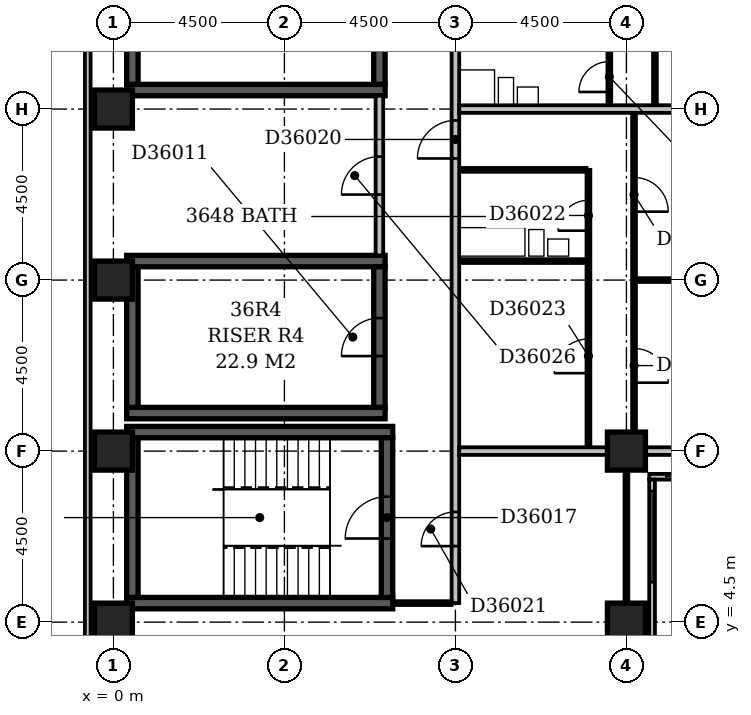
"""IFC4 building model, lengths in metres.
Left out: names, types, materials, properties, quantities, classifications, styles, units other than length and angle.
Written with IfcOpenShell. Run it as: python <this file> out.ifc"""

import sys

from ifc_helpers import new_model, si_unit, direction, frame, frame_2d, origin, origin_2d, place, context, subcontext, project, spatial, rectangle, extrude, element, fill, save


model = new_model("IFC4")
c1 = context("Model", 3, precision=1e-05, world=origin(), true_north=direction((0.0, 1.0)))
c2 = subcontext(c1, "Body", "Model", "MODEL_VIEW")
j1 = project(units=[si_unit("LENGTHUNIT", "METRE"), si_unit("PLANEANGLEUNIT", "RADIAN")], contexts=[c1])
p1 = place(None, origin())
s1 = spatial("IfcSite", under=j1, at=p1, CompositionType="ELEMENT")
p2 = place(p1, origin())
s2 = spatial("IfcBuilding", under=s1, at=p2, CompositionType="ELEMENT")
p3 = place(p2, frame((0.0, 0.0, 144.8)))
s3 = spatial("IfcBuildingStorey", under=s2, at=p3, CompositionType="ELEMENT", Elevation=144.8)
for number, where, z_axis, x_axis in (
    (1, (0.35, 5.0, -0.3), (0.0, 0.0, 1.0), (1.0, 0.0, 0.0)),
    (2, (0.35, 9.5, -0.3), (0.0, 0.0, 1.0), (1.0, 0.0, 0.0)),
):
    element("IfcWall", number, at=place(p3, frame(where, z_axis=z_axis, x_axis=x_axis)), inside=s3, PredefinedType="SHEAR", context=c2, shape_type="SweptSolid", body=[
        extrude(rectangle(XDim=7.0, YDim=0.3, at=frame_2d((3.5, 0.0))), origin(), (0.0, 0.0, 1.0), 3.6),
    ])
for number, where, z_axis, x_axis in (
    (3, (0.35, 10.0, -0.3), (0.0, 0.0, 1.0), (1.0, 0.0, 0.0)),
    (4, (0.35, 14.0, -0.3), (0.0, 0.0, 1.0), (1.0, 0.0, 0.0)),
    (5, (0.35, 18.5, -0.3), (0.0, 0.0, 1.0), (1.0, 0.0, 0.0)),
):
    element("IfcWall", number, at=place(p3, frame(where, z_axis=z_axis, x_axis=x_axis)), inside=s3, PredefinedType="SHEAR", context=c2, shape_type="SweptSolid", body=[
        extrude(rectangle(XDim=6.8, YDim=0.3, at=frame_2d((3.4, 0.0))), origin(), (0.0, 0.0, 1.0), 3.6),
    ])
p4 = place(p3, frame((0.5, 5.15, -0.3), z_axis=(0.0, 0.0, 1.0), x_axis=(0.0, 1.0, 0.0)))
e6 = element("IfcWall", 6, at=p4, inside=s3, PredefinedType="SHEAR", context=c2, shape_type="SweptSolid", body=[
    extrude(rectangle(XDim=4.2, YDim=0.3, at=frame_2d((2.1, 0.0))), origin(), (0.0, 0.0, 1.0), 3.6),
])
for number, where, z_axis, x_axis in (
    (7, (0.5, 10.15, -0.3), (0.0, 0.0, 1.0), (0.0, 1.0, 0.0)),
    (8, (0.5, 18.65, -0.3), (0.0, 0.0, 1.0), (0.0, 1.0, 0.0)),
):
    element("IfcWall", number, at=place(p3, frame(where, z_axis=z_axis, x_axis=x_axis)), inside=s3, PredefinedType="SHEAR", context=c2, shape_type="SweptSolid", body=[
        extrude(rectangle(XDim=3.7, YDim=0.3, at=frame_2d((1.85, 0.0))), origin(), (0.0, 0.0, 1.0), 3.6),
    ])
p5 = place(p3, frame((7.0, 10.15, -0.3), z_axis=(0.0, 0.0, 1.0), x_axis=(0.0, 1.0, 0.0)))
e9 = element("IfcWall", 9, at=p5, inside=s3, PredefinedType="SHEAR", context=c2, shape_type="SweptSolid", body=[
    extrude(rectangle(XDim=3.7, YDim=0.3, at=frame_2d((1.85, 0.0))), origin(), (0.0, 0.0, 1.0), 3.6),
])
p6 = place(p5, frame((1.35, 0.0, 0.3)))
e10 = element("IfcOpeningElement", 10, at=p6, cuts=e9, PredefinedType="OPENING", context=c2, shape_type="SweptSolid", body=[
    extrude(rectangle(XDim=1.0, YDim=2.1, at=frame_2d((0.5, 1.05))), frame((0.0, 0.162, 0.0), z_axis=(0.0, -1.0, 0.0), x_axis=(1.0, 0.0, 0.0)), (0.0, 0.0, 1.0), 0.324),
])
p7 = place(p3, frame((7.0, 18.65, -0.3), z_axis=(0.0, 0.0, 1.0), x_axis=(0.0, 1.0, 0.0)))
e11 = element("IfcWall", 11, at=p7, inside=s3, PredefinedType="SHEAR", context=c2, shape_type="SweptSolid", body=[
    extrude(rectangle(XDim=3.7, YDim=0.3, at=frame_2d((1.85, 0.0))), origin(), (0.0, 0.0, 1.0), 3.6),
])
p8 = place(p7, frame((1.35, 0.0, 0.3)))
e12 = element("IfcOpeningElement", 12, at=p8, cuts=e11, PredefinedType="OPENING", context=c2, shape_type="SweptSolid", body=[
    extrude(rectangle(XDim=1.0, YDim=2.1, at=frame_2d((0.5, 1.05))), frame((0.0, 0.162, 0.0), z_axis=(0.0, -1.0, 0.0), x_axis=(1.0, 0.0, 0.0)), (0.0, 0.0, 1.0), 0.324),
])
p9 = place(p3, frame((7.2, 5.15, -0.3), z_axis=(0.0, 0.0, 1.0), x_axis=(0.0, 1.0, 0.0)))
e13 = element("IfcWall", 13, at=p9, inside=s3, PredefinedType="SHEAR", context=c2, shape_type="SweptSolid", body=[
    extrude(rectangle(XDim=4.2, YDim=0.3, at=frame_2d((2.1, 0.0))), origin(), (0.0, 0.0, 1.0), 3.6),
])
p10 = place(p9, frame((1.55, 0.0, 0.3)))
e14 = element("IfcOpeningElement", 14, at=p10, cuts=e13, PredefinedType="OPENING", context=c2, shape_type="SweptSolid", body=[
    extrude(rectangle(XDim=1.1, YDim=2.1, at=frame_2d((0.55, 1.05))), frame((0.0, 0.162, 0.0), z_axis=(0.0, -1.0, 0.0), x_axis=(1.0, 0.0, 0.0)), (0.0, 0.0, 1.0), 0.324),
])
for number, where, z_axis, x_axis in (
    (15, (0.0, 4.5, -0.3), (0.0, 0.0, 1.0), (1.0, 0.0, 0.0)),
    (16, (13.5, 4.5, -0.3), (0.0, 0.0, 1.0), (1.0, 0.0, 0.0)),
    (17, (0.0, 9.0, -0.3), (0.0, 0.0, 1.0), (1.0, 0.0, 0.0)),
    (18, (13.5, 9.0, -0.3), (0.0, 0.0, 1.0), (1.0, 0.0, 0.0)),
    (19, (0.0, 13.5, -0.3), (0.0, 0.0, 1.0), (1.0, 0.0, 0.0)),
    (20, (0.0, 18.0, -0.3), (0.0, 0.0, 1.0), (1.0, 0.0, 0.0)),
):
    element("IfcColumn", number, at=place(p3, frame(where, z_axis=z_axis, x_axis=x_axis)), inside=s3, PredefinedType="COLUMN", context=c2, shape_type="SweptSolid", body=[
        extrude(rectangle(XDim=1.0, YDim=1.0, at=origin_2d()), origin(), (0.0, 0.0, 1.0), 3.6),
    ])
p11 = place(p3, frame((14.175, 3.9, 0.0), z_axis=(0.0, 0.0, 1.0), x_axis=(0.0, 1.0, 0.0)))
e21 = element("IfcWall", 21, at=p11, inside=s3, PredefinedType="STANDARD", context=c2, shape_type="SweptSolid", body=[
    extrude(rectangle(XDim=4.35, YDim=0.15, at=frame_2d((2.175, 0.0))), origin(), (0.0, 0.0, 1.0), 2.7),
])
p12 = place(p11, frame((1.65, 0.0, 0.6)))
e22 = element("IfcOpeningElement", 22, at=p12, cuts=e21, PredefinedType="OPENING", context=c2, shape_type="SweptSolid", body=[
    extrude(rectangle(XDim=2.4, YDim=1.8, at=frame_2d((1.2, 0.9))), frame((0.0, 0.087, 0.0), z_axis=(0.0, -1.0, 0.0), x_axis=(1.0, 0.0, 0.0)), (0.0, 0.0, 1.0), 0.174),
])
p13 = place(p3, frame((14.1, 8.325, 0.0), z_axis=(0.0, 0.0, 1.0), x_axis=(1.0, 0.0, 0.0)))
e23 = element("IfcWall", 23, at=p13, inside=s3, PredefinedType="STANDARD", context=c2, shape_type="SweptSolid", body=[
    extrude(rectangle(XDim=4.65, YDim=0.15, at=frame_2d((2.325, 0.0))), origin(), (0.0, 0.0, 1.0), 2.7),
])
p14 = place(p13, frame((0.45, 0.0, 0.6)))
e24 = element("IfcOpeningElement", 24, at=p14, cuts=e23, PredefinedType="OPENING", context=c2, shape_type="SweptSolid", body=[
    extrude(rectangle(XDim=2.4, YDim=1.8, at=frame_2d((1.2, 0.9))), frame((0.0, 0.087, 0.0), z_axis=(0.0, -1.0, 0.0), x_axis=(1.0, 0.0, 0.0)), (0.0, 0.0, 1.0), 0.174),
])
p15 = place(p3, frame((-0.675, 59.1, 0.0), z_axis=(0.0, 0.0, 1.0), x_axis=(0.0, -1.0, 0.0)))
e25 = element("IfcWall", 25, at=p15, inside=s3, PredefinedType="STANDARD", context=c2, shape_type="SweptSolid", body=[
    extrude(rectangle(XDim=55.35, YDim=0.15, at=frame_2d((27.675, 0.0))), origin(), (0.0, 0.0, 1.0), 2.7),
])
p16 = place(p3, frame((0.0, 4.5, 0.0), z_axis=(0.0, 0.0, 1.0), x_axis=(0.0, 1.0, 0.0)))
e26 = element("IfcWall", 26, at=p16, inside=s3, PredefinedType="PARTITIONING", context=c2, shape_type="SweptSolid", body=[
    extrude(rectangle(XDim=0.5, YDim=0.1, at=frame_2d((0.25, 0.0))), origin(), (0.0, 0.0, 1.0), 2.7),
])
p17 = place(p3, frame((7.349, 5.0, 0.0), z_axis=(0.0, 0.0, 1.0), x_axis=(1.0, 0.0, 0.0)))
e27 = element("IfcWall", 27, at=p17, inside=s3, PredefinedType="PARTITIONING", context=c2, shape_type="SweptSolid", body=[
    extrude(rectangle(XDim=1.551, YDim=0.1, at=frame_2d((0.775, 0.0))), origin(), (0.0, 0.0, 1.0), 3.3),
])
p18 = place(p3, frame((9.0, 5.0, 0.0), z_axis=(0.0, 0.0, 1.0), x_axis=(0.0, 1.0, 0.0)))
e28 = element("IfcWall", 28, at=p18, inside=s3, PredefinedType="PARTITIONING", context=c2, shape_type="SweptSolid", body=[
    extrude(rectangle(XDim=27.75, YDim=0.2, at=frame_2d((13.875, 0.0))), origin(), (0.0, 0.0, 1.0), 3.3),
])
p19 = place(p18, frame((17.8, 0.0, 0.0)))
e29 = element("IfcOpeningElement", 29, at=p19, cuts=e28, PredefinedType="OPENING", context=c2, shape_type="SweptSolid", body=[
    extrude(rectangle(XDim=1.0, YDim=2.1, at=frame_2d((0.5, 1.05))), frame((0.0, 0.112, 0.0), z_axis=(0.0, -1.0, 0.0), x_axis=(1.0, 0.0, 0.0)), (0.0, 0.0, 1.0), 0.224),
])
p20 = place(p18, frame((14.95, 0.0, 0.0)))
e30 = element("IfcOpeningElement", 30, at=p20, cuts=e28, PredefinedType="OPENING", context=c2, shape_type="SweptSolid", body=[
    extrude(rectangle(XDim=1.0, YDim=2.1, at=frame_2d((0.5, 1.05))), frame((0.0, 0.112, 0.0), z_axis=(0.0, -1.0, 0.0), x_axis=(1.0, 0.0, 0.0)), (0.0, 0.0, 1.0), 0.224),
])
p21 = place(p18, frame((11.7, 0.0, 0.0)))
e31 = element("IfcOpeningElement", 31, at=p21, cuts=e28, PredefinedType="OPENING", context=c2, shape_type="SweptSolid", body=[
    extrude(rectangle(XDim=1.0, YDim=2.1, at=frame_2d((0.5, 1.05))), frame((0.0, 0.112, 0.0), z_axis=(0.0, -1.0, 0.0), x_axis=(1.0, 0.0, 0.0)), (0.0, 0.0, 1.0), 0.224),
])
p22 = place(p18, frame((1.5, 0.0, 0.0)))
e32 = element("IfcOpeningElement", 32, at=p22, cuts=e28, PredefinedType="OPENING", context=c2, shape_type="SweptSolid", body=[
    extrude(rectangle(XDim=0.9, YDim=2.1, at=frame_2d((0.45, 1.05))), frame((0.0, 0.112, 0.0), z_axis=(0.0, -1.0, 0.0), x_axis=(1.0, 0.0, 0.0)), (0.0, 0.0, 1.0), 0.224),
])
p23 = place(p3, frame((13.5, 5.0, 0.0), z_axis=(0.0, 0.0, 1.0), x_axis=(0.0, 1.0, 0.0)))
e33 = element("IfcWall", 33, at=p23, inside=s3, PredefinedType="PARTITIONING", context=c2, shape_type="SweptSolid", body=[
    extrude(rectangle(XDim=3.5, YDim=0.1, at=frame_2d((1.75, 0.0))), origin(), (0.0, 0.0, 1.0), 2.7),
])
p24 = place(p3, frame((9.1, 9.0, 0.0), z_axis=(0.0, 0.0, 1.0), x_axis=(1.0, 0.0, 0.0)))
e34 = element("IfcWall", 34, at=p24, inside=s3, PredefinedType="PARTITIONING", context=c2, shape_type="SweptSolid", body=[
    extrude(rectangle(XDim=3.9, YDim=0.2, at=frame_2d((1.95, 0.0))), origin(), (0.0, 0.0, 1.0), 3.3),
])
p25 = place(p3, frame((14.0, 9.0, 0.0), z_axis=(0.0, 0.0, 1.0), x_axis=(1.0, 0.0, 0.0)))
e35 = element("IfcWall", 35, at=p25, inside=s3, PredefinedType="PARTITIONING", context=c2, shape_type="SweptSolid", body=[
    extrude(rectangle(XDim=3.5, YDim=0.2, at=frame_2d((1.75, 0.0))), origin(), (0.0, 0.0, 1.0), 2.7),
])
p26 = place(p3, frame((12.5, 9.1, 0.0), z_axis=(0.0, 0.0, 1.0), x_axis=(0.0, 1.0, 0.0)))
e36 = element("IfcWall", 36, at=p26, inside=s3, PredefinedType="PARTITIONING", context=c2, shape_type="SweptSolid", body=[
    extrude(rectangle(XDim=7.3, YDim=0.1, at=frame_2d((3.65, 0.0))), origin(), (0.0, 0.0, 1.0), 3.3),
])
p27 = place(p26, frame((5.7, 0.0, 0.0)))
e37 = element("IfcOpeningElement", 37, at=p27, cuts=e36, PredefinedType="OPENING", context=c2, shape_type="SweptSolid", body=[
    extrude(rectangle(XDim=0.8, YDim=2.1, at=frame_2d((0.4, 1.05))), frame((0.0, 0.062, 0.0), z_axis=(0.0, -1.0, 0.0), x_axis=(1.0, 0.0, 0.0)), (0.0, 0.0, 1.0), 0.124),
])
p28 = place(p26, frame((1.95, 0.0, 0.0)))
e38 = element("IfcOpeningElement", 38, at=p28, cuts=e36, PredefinedType="OPENING", context=c2, shape_type="SweptSolid", body=[
    extrude(rectangle(XDim=0.9, YDim=2.1, at=frame_2d((0.45, 1.05))), frame((0.0, 0.062, 0.0), z_axis=(0.0, -1.0, 0.0), x_axis=(1.0, 0.0, 0.0)), (0.0, 0.0, 1.0), 0.124),
])
p29 = place(p3, frame((13.7, 9.5, 0.0), z_axis=(0.0, 0.0, 1.0), x_axis=(0.0, 1.0, 0.0)))
e39 = element("IfcWall", 39, at=p29, inside=s3, PredefinedType="PARTITIONING", context=c2, shape_type="SweptSolid", body=[
    extrude(rectangle(XDim=8.4, YDim=0.1, at=frame_2d((4.2, 0.0))), origin(), (0.0, 0.0, 1.0), 3.3),
])
p30 = place(p29, frame((1.3, 0.0, 0.0)))
e40 = element("IfcOpeningElement", 40, at=p30, cuts=e39, PredefinedType="OPENING", context=c2, shape_type="SweptSolid", body=[
    extrude(rectangle(XDim=0.9, YDim=2.1, at=frame_2d((0.45, 1.05))), frame((0.0, 0.062, 0.0), z_axis=(0.0, -1.0, 0.0), x_axis=(1.0, 0.0, 0.0)), (0.0, 0.0, 1.0), 0.124),
])
p31 = place(p29, frame((5.8, 0.0, 0.0)))
e41 = element("IfcOpeningElement", 41, at=p31, cuts=e39, PredefinedType="OPENING", context=c2, shape_type="SweptSolid", body=[
    extrude(rectangle(XDim=0.9, YDim=2.1, at=frame_2d((0.45, 1.05))), frame((0.0, 0.062, 0.0), z_axis=(0.0, -1.0, 0.0), x_axis=(1.0, 0.0, 0.0)), (0.0, 0.0, 1.0), 0.124),
])
p32 = place(p3, frame((13.75, 13.5, 0.0), z_axis=(0.0, 0.0, 1.0), x_axis=(1.0, 0.0, 0.0)))
e42 = element("IfcWall", 42, at=p32, inside=s3, PredefinedType="PARTITIONING", context=c2, shape_type="SweptSolid", body=[
    extrude(rectangle(XDim=3.75, YDim=0.1, at=frame_2d((1.875, 0.0))), origin(), (0.0, 0.0, 1.0), 3.3),
])
p33 = place(p3, frame((9.1, 14.0, 0.0), z_axis=(0.0, 0.0, 1.0), x_axis=(1.0, 0.0, 0.0)))
e43 = element("IfcWall", 43, at=p33, inside=s3, PredefinedType="PLUMBINGWALL", context=c2, shape_type="SweptSolid", body=[
    extrude(rectangle(XDim=3.35, YDim=0.1, at=frame_2d((1.675, 0.0))), origin(), (0.0, 0.0, 1.0), 3.3),
])
p34 = place(p3, frame((7.0, 14.15, 0.0), z_axis=(0.0, 0.0, 1.0), x_axis=(0.0, 1.0, 0.0)))
e44 = element("IfcWall", 44, at=p34, inside=s3, PredefinedType="PARTITIONING", context=c2, shape_type="SweptSolid", body=[
    extrude(rectangle(XDim=4.2, YDim=0.2, at=frame_2d((2.1, 0.0))), origin(), (0.0, 0.0, 1.0), 3.3),
])
p35 = place(p34, frame((1.6, 0.0, 0.0)))
e45 = element("IfcOpeningElement", 45, at=p35, cuts=e44, PredefinedType="OPENING", context=c2, shape_type="SweptSolid", body=[
    extrude(rectangle(XDim=1.0, YDim=2.1, at=frame_2d((0.5, 1.05))), frame((0.0, 0.112, 0.0), z_axis=(0.0, -1.0, 0.0), x_axis=(1.0, 0.0, 0.0)), (0.0, 0.0, 1.0), 0.224),
])
p36 = place(p3, frame((9.1, 16.4, 0.0), z_axis=(0.0, 0.0, 1.0), x_axis=(1.0, 0.0, 0.0)))
e46 = element("IfcWall", 46, at=p36, inside=s3, PredefinedType="PLUMBINGWALL", context=c2, shape_type="SweptSolid", body=[
    extrude(rectangle(XDim=3.35, YDim=0.1, at=frame_2d((1.675, 0.0))), origin(), (0.0, 0.0, 1.0), 3.3),
])
p37 = place(p3, frame((9.1, 18.0, 0.0), z_axis=(0.0, 0.0, 1.0), x_axis=(1.0, 0.0, 0.0)))
e47 = element("IfcWall", 47, at=p37, inside=s3, PredefinedType="PARTITIONING", context=c2, shape_type="SweptSolid", body=[
    extrude(rectangle(XDim=8.4, YDim=0.2, at=frame_2d((4.2, 0.0))), origin(), (0.0, 0.0, 1.0), 2.6),
])
p38 = place(p3, frame((13.05, 18.1, 0.0), z_axis=(0.0, 0.0, 1.0), x_axis=(0.0, 1.0, 0.0)))
e48 = element("IfcWall", 48, at=p38, inside=s3, PredefinedType="PARTITIONING", context=c2, shape_type="SweptSolid", body=[
    extrude(rectangle(XDim=1.6, YDim=0.1, at=frame_2d((0.8, 0.0))), origin(), (0.0, 0.0, 1.0), 3.3),
])
p39 = place(p38, frame((0.35, 0.0, 0.0)))
e49 = element("IfcOpeningElement", 49, at=p39, cuts=e48, PredefinedType="OPENING", context=c2, shape_type="SweptSolid", body=[
    extrude(rectangle(XDim=0.8, YDim=2.1, at=frame_2d((0.4, 1.05))), frame((0.0, 0.062, 0.0), z_axis=(0.0, -1.0, 0.0), x_axis=(1.0, 0.0, 0.0)), (0.0, 0.0, 1.0), 0.124),
])
p40 = place(p3, frame((14.25, 18.1, 0.0), z_axis=(0.0, 0.0, 1.0), x_axis=(0.0, 1.0, 0.0)))
e50 = element("IfcWall", 50, at=p40, inside=s3, PredefinedType="PARTITIONING", context=c2, shape_type="SweptSolid", body=[
    extrude(rectangle(XDim=4.3, YDim=0.1, at=frame_2d((2.15, 0.0))), origin(), (0.0, 0.0, 1.0), 3.3),
])
p41 = place(p40, frame((1.7, 0.0, 0.0)))
e51 = element("IfcOpeningElement", 51, at=p41, cuts=e50, PredefinedType="OPENING", context=c2, shape_type="SweptSolid", body=[
    extrude(rectangle(XDim=0.9, YDim=2.1, at=frame_2d((0.45, 1.05))), frame((0.0, 0.062, 0.0), z_axis=(0.0, -1.0, 0.0), x_axis=(1.0, 0.0, 0.0)), (0.0, 0.0, 1.0), 0.124),
])
p42 = place(p12, origin())
e52 = element("IfcWindow", 52, at=p42, inside=s3, PartitioningType="SINGLE_PANEL", PredefinedType="WINDOW", context=c2, shape_type="SweptSolid", body=[
    extrude(rectangle(XDim=2.4, YDim=1.8, at=frame_2d((1.2, 0.9))), frame((0.0, 0.03, 0.0), z_axis=(0.0, -1.0, 0.0), x_axis=(1.0, 0.0, 0.0)), (0.0, 0.0, 1.0), 0.06),
])
fill(e22, e52)
p43 = place(p14, origin())
e53 = element("IfcWindow", 53, at=p43, inside=s3, PartitioningType="SINGLE_PANEL", PredefinedType="WINDOW", context=c2, shape_type="SweptSolid", body=[
    extrude(rectangle(XDim=2.4, YDim=1.8, at=frame_2d((1.2, 0.9))), frame((0.0, 0.03, 0.0), z_axis=(0.0, -1.0, 0.0), x_axis=(1.0, 0.0, 0.0)), (0.0, 0.0, 1.0), 0.06),
])
fill(e24, e53)
p44 = place(p6, origin())
e54 = element("IfcDoor", 54, at=p44, inside=s3, OperationType="SINGLE_SWING_LEFT", PredefinedType="DOOR", context=c2, shape_type="SweptSolid", body=[
    extrude(rectangle(XDim=1.0, YDim=2.1, at=frame_2d((0.5, 1.05))), frame((0.0, 0.025, 0.0), z_axis=(0.0, -1.0, 0.0), x_axis=(1.0, 0.0, 0.0)), (0.0, 0.0, 1.0), 0.05),
])
fill(e10, e54)
p45 = place(p10, origin())
e55 = element("IfcDoor", 55, at=p45, inside=s3, OperationType="SINGLE_SWING_LEFT", PredefinedType="DOOR", context=c2, shape_type="SweptSolid", body=[
    extrude(rectangle(XDim=1.1, YDim=2.1, at=frame_2d((0.55, 1.05))), frame((0.0, 0.025, 0.0), z_axis=(0.0, -1.0, 0.0), x_axis=(1.0, 0.0, 0.0)), (0.0, 0.0, 1.0), 0.05),
])
fill(e14, e55)
p46 = place(p21, origin())
e56 = element("IfcDoor", 56, at=p46, inside=s3, OperationType="SINGLE_SWING_LEFT", PredefinedType="DOOR", context=c2, shape_type="SweptSolid", body=[
    extrude(rectangle(XDim=1.0, YDim=2.1, at=frame_2d((0.5, 1.05))), frame((0.0, 0.025, 0.0), z_axis=(0.0, -1.0, 0.0), x_axis=(1.0, 0.0, 0.0)), (0.0, 0.0, 1.0), 0.05),
])
fill(e31, e56)
p47 = place(p22, origin())
e57 = element("IfcDoor", 57, at=p47, inside=s3, OperationType="SINGLE_SWING_LEFT", PredefinedType="DOOR", context=c2, shape_type="SweptSolid", body=[
    extrude(rectangle(XDim=0.9, YDim=2.1, at=frame_2d((0.45, 1.05))), frame((0.0, 0.025, 0.0), z_axis=(0.0, -1.0, 0.0), x_axis=(1.0, 0.0, 0.0)), (0.0, 0.0, 1.0), 0.05),
])
fill(e32, e57)
p48 = place(p27, origin())
e58 = element("IfcDoor", 58, at=p48, inside=s3, OperationType="SINGLE_SWING_LEFT", PredefinedType="DOOR", context=c2, shape_type="SweptSolid", body=[
    extrude(rectangle(XDim=0.8, YDim=2.1, at=frame_2d((0.4, 1.05))), frame((0.0, 0.025, 0.0), z_axis=(0.0, -1.0, 0.0), x_axis=(1.0, 0.0, 0.0)), (0.0, 0.0, 1.0), 0.05),
])
fill(e37, e58)
p49 = place(p28, origin())
e59 = element("IfcDoor", 59, at=p49, inside=s3, OperationType="SINGLE_SWING_LEFT", PredefinedType="DOOR", context=c2, shape_type="SweptSolid", body=[
    extrude(rectangle(XDim=0.9, YDim=2.1, at=frame_2d((0.45, 1.05))), frame((0.0, 0.025, 0.0), z_axis=(0.0, -1.0, 0.0), x_axis=(1.0, 0.0, 0.0)), (0.0, 0.0, 1.0), 0.05),
])
fill(e38, e59)
p50 = place(p30, frame((0.9, 0.0, 0.0), z_axis=(0.0, 0.0, 1.0), x_axis=(-1.0, 0.0, 0.0)))
e60 = element("IfcDoor", 60, at=p50, inside=s3, OperationType="SINGLE_SWING_RIGHT", PredefinedType="DOOR", context=c2, shape_type="SweptSolid", body=[
    extrude(rectangle(XDim=0.9, YDim=2.1, at=frame_2d((0.45, 1.05))), frame((0.0, 0.025, 0.0), z_axis=(0.0, -1.0, 0.0), x_axis=(1.0, 0.0, 0.0)), (0.0, 0.0, 1.0), 0.05),
])
fill(e40, e60)
p51 = place(p31, frame((0.9, 0.0, 0.0), z_axis=(0.0, 0.0, 1.0), x_axis=(-1.0, 0.0, 0.0)))
e61 = element("IfcDoor", 61, at=p51, inside=s3, OperationType="SINGLE_SWING_RIGHT", PredefinedType="DOOR", context=c2, shape_type="SweptSolid", body=[
    extrude(rectangle(XDim=0.9, YDim=2.1, at=frame_2d((0.45, 1.05))), frame((0.0, 0.025, 0.0), z_axis=(0.0, -1.0, 0.0), x_axis=(1.0, 0.0, 0.0)), (0.0, 0.0, 1.0), 0.05),
])
fill(e41, e61)
p52 = place(p35, origin())
e62 = element("IfcDoor", 62, at=p52, inside=s3, OperationType="SINGLE_SWING_LEFT", PredefinedType="DOOR", context=c2, shape_type="SweptSolid", body=[
    extrude(rectangle(XDim=1.0, YDim=2.1, at=frame_2d((0.5, 1.05))), frame((0.0, 0.025, 0.0), z_axis=(0.0, -1.0, 0.0), x_axis=(1.0, 0.0, 0.0)), (0.0, 0.0, 1.0), 0.05),
])
fill(e45, e62)
p53 = place(p39, origin())
e63 = element("IfcDoor", 63, at=p53, inside=s3, OperationType="SINGLE_SWING_LEFT", PredefinedType="DOOR", context=c2, shape_type="SweptSolid", body=[
    extrude(rectangle(XDim=0.8, YDim=2.1, at=frame_2d((0.4, 1.05))), frame((0.0, 0.025, 0.0), z_axis=(0.0, -1.0, 0.0), x_axis=(1.0, 0.0, 0.0)), (0.0, 0.0, 1.0), 0.05),
])
fill(e49, e63)
save(model, sys.argv[1])
